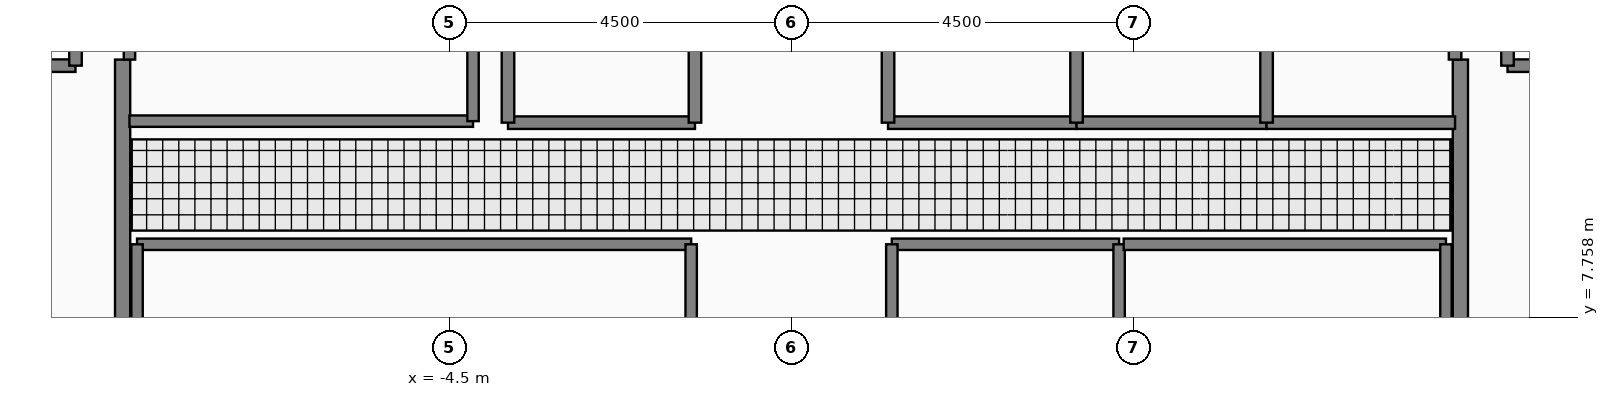
"""IFC4 building model, lengths in metres.
Left out: names, types, materials, properties, quantities, classifications, styles, units other than length and angle.
Written with IfcOpenShell. Run it as: python <this file> out.ifc"""

import sys

from ifc_helpers import new_model, si_unit, direction, frame, frame_2d, origin, place, context, subcontext, project, spatial, rectangle, extrude, element, fill, save


model = new_model("IFC4")
c1 = context("Model", 3, precision=1e-05, world=origin(), true_north=direction((0.0, 1.0)))
c2 = subcontext(c1, "Body", "Model", "MODEL_VIEW")
j1 = project(units=[si_unit("LENGTHUNIT", "METRE"), si_unit("PLANEANGLEUNIT", "RADIAN")], contexts=[c1])
p1 = place(None, origin())
s1 = spatial("IfcSite", under=j1, at=p1, CompositionType="ELEMENT")
p2 = place(p1, origin())
s2 = spatial("IfcBuilding", under=s1, at=p2, CompositionType="ELEMENT")
p3 = place(p2, frame((0.0, 0.0, 168.2)))
s3 = spatial("IfcBuildingStorey", under=s2, at=p3, CompositionType="ELEMENT", Elevation=168.2)
p4 = place(p3, frame((-8.8, 5.05, 0.0), z_axis=(0.0, 0.0, 1.0), x_axis=(0.0, 1.0, 0.0)))
e1 = element("IfcWall", 1, at=p4, inside=s3, PredefinedType="PARTITIONING", context=c2, shape_type="SweptSolid", body=[
    extrude(rectangle(XDim=6.1, YDim=0.2, at=frame_2d((3.05, 0.0))), origin(), (0.0, 0.0, 1.0), 4.38),
])
p5 = place(p4, frame((0.25, 0.0, 0.0)))
e2 = element("IfcOpeningElement", 2, at=p5, cuts=e1, PredefinedType="OPENING", context=c2, shape_type="SweptSolid", body=[
    extrude(rectangle(XDim=1.1, YDim=2.2, at=frame_2d((0.55, 1.1))), frame((0.0, 0.11, 0.0), z_axis=(0.0, -1.0, 0.0), x_axis=(1.0, 0.0, 0.0)), (0.0, 0.0, 1.0), 0.22),
])
p6 = place(p4, frame((3.85, 0.0, 0.0)))
e3 = element("IfcOpeningElement", 3, at=p6, cuts=e1, PredefinedType="OPENING", context=c2, shape_type="SweptSolid", body=[
    extrude(rectangle(XDim=1.1, YDim=2.2, at=frame_2d((0.55, 1.1))), frame((0.0, 0.11, 0.0), z_axis=(0.0, -1.0, 0.0), x_axis=(1.0, 0.0, 0.0)), (0.0, 0.0, 1.0), 0.22),
])
p7 = place(p3, frame((8.8, 11.15, 0.0), z_axis=(0.0, 0.0, 1.0), x_axis=(0.0, -1.0, 0.0)))
e4 = element("IfcWall", 4, at=p7, inside=s3, PredefinedType="PARTITIONING", context=c2, shape_type="SweptSolid", body=[
    extrude(rectangle(XDim=6.1, YDim=0.2, at=frame_2d((3.05, 0.0))), origin(), (0.0, 0.0, 1.0), 4.38),
])
p8 = place(p7, frame((1.15, 0.0, 0.0)))
e5 = element("IfcOpeningElement", 5, at=p8, cuts=e4, PredefinedType="OPENING", context=c2, shape_type="SweptSolid", body=[
    extrude(rectangle(XDim=1.1, YDim=2.2, at=frame_2d((0.55, 1.1))), frame((0.0, 0.11, 0.0), z_axis=(0.0, -1.0, 0.0), x_axis=(1.0, 0.0, 0.0)), (0.0, 0.0, 1.0), 0.22),
])
p9 = place(p7, frame((4.75, 0.0, 0.0)))
e6 = element("IfcOpeningElement", 6, at=p9, cuts=e4, PredefinedType="OPENING", context=c2, shape_type="SweptSolid", body=[
    extrude(rectangle(XDim=1.1, YDim=2.2, at=frame_2d((0.55, 1.1))), frame((0.0, 0.11, 0.0), z_axis=(0.0, -1.0, 0.0), x_axis=(1.0, 0.0, 0.0)), (0.0, 0.0, 1.0), 0.22),
])
p10 = place(p3, frame((-11.58, 11.07, 0.0), z_axis=(0.0, 0.0, 1.0), x_axis=(1.0, 0.0, 0.0)))
e7 = element("IfcWall", 7, at=p10, inside=s3, PredefinedType="PARTITIONING", context=c2, shape_type="SweptSolid", body=[
    extrude(rectangle(XDim=2.16, YDim=0.165, at=frame_2d((1.08, 0.0))), origin(), (0.0, 0.0, 1.0), 4.38),
])
p11 = place(p10, frame((0.53, 0.0, 0.0)))
e8 = element("IfcOpeningElement", 8, at=p11, cuts=e7, PredefinedType="OPENING", context=c2, shape_type="SweptSolid", body=[
    extrude(rectangle(XDim=1.15, YDim=2.25, at=frame_2d((0.575, 1.125))), frame((0.0, 0.093, 0.0), z_axis=(0.0, -1.0, 0.0), x_axis=(1.0, 0.0, 0.0)), (0.0, 0.0, 1.0), 0.185),
])
p12 = place(p3, frame((9.42, 11.07, 0.0), z_axis=(0.0, 0.0, 1.0), x_axis=(1.0, 0.0, 0.0)))
e9 = element("IfcWall", 9, at=p12, inside=s3, PredefinedType="PARTITIONING", context=c2, shape_type="SweptSolid", body=[
    extrude(rectangle(XDim=2.16, YDim=0.165, at=frame_2d((1.08, 0.0))), origin(), (0.0, 0.0, 1.0), 4.38),
])
p13 = place(p12, frame((0.53, 0.0, 0.0)))
e10 = element("IfcOpeningElement", 10, at=p13, cuts=e9, PredefinedType="OPENING", context=c2, shape_type="SweptSolid", body=[
    extrude(rectangle(XDim=1.15, YDim=2.25, at=frame_2d((0.575, 1.125))), frame((0.0, 0.093, 0.0), z_axis=(0.0, -1.0, 0.0), x_axis=(1.0, 0.0, 0.0)), (0.0, 0.0, 1.0), 0.185),
])
p14 = place(p3, frame((-3.73, 10.32, 0.0), z_axis=(0.0, 0.0, 1.0), x_axis=(1.0, 0.0, 0.0)))
e11 = element("IfcWall", 11, at=p14, inside=s3, PredefinedType="PARTITIONING", context=c2, shape_type="SweptSolid", body=[
    extrude(rectangle(XDim=2.46, YDim=0.165, at=frame_2d((1.23, 0.0))), origin(), (0.0, 0.0, 1.0), 4.38),
])
p15 = place(p14, frame((0.68, 0.0, 0.0)))
e12 = element("IfcOpeningElement", 12, at=p15, cuts=e11, PredefinedType="OPENING", context=c2, shape_type="SweptSolid", body=[
    extrude(rectangle(XDim=1.1, YDim=2.25, at=frame_2d((0.55, 1.125))), frame((0.0, 0.093, 0.0), z_axis=(0.0, -1.0, 0.0), x_axis=(1.0, 0.0, 0.0)), (0.0, 0.0, 1.0), 0.185),
])
p16 = place(p3, frame((1.27, 10.32, 0.0), z_axis=(0.0, 0.0, 1.0), x_axis=(1.0, 0.0, 0.0)))
e13 = element("IfcWall", 13, at=p16, inside=s3, PredefinedType="PARTITIONING", context=c2, shape_type="SweptSolid", body=[
    extrude(rectangle(XDim=2.48, YDim=0.165, at=frame_2d((1.24, 0.0))), origin(), (0.0, 0.0, 1.0), 4.38),
])
p17 = place(p16, frame((0.69, 0.0, 0.0)))
e14 = element("IfcOpeningElement", 14, at=p17, cuts=e13, PredefinedType="OPENING", context=c2, shape_type="SweptSolid", body=[
    extrude(rectangle(XDim=1.1, YDim=2.25, at=frame_2d((0.55, 1.125))), frame((0.0, 0.093, 0.0), z_axis=(0.0, -1.0, 0.0), x_axis=(1.0, 0.0, 0.0)), (0.0, 0.0, 1.0), 0.185),
])
p18 = place(p3, frame((3.75, 10.32, 0.0), z_axis=(0.0, 0.0, 1.0), x_axis=(1.0, 0.0, 0.0)))
e15 = element("IfcWall", 15, at=p18, inside=s3, PredefinedType="PARTITIONING", context=c2, shape_type="SweptSolid", body=[
    extrude(rectangle(XDim=2.5, YDim=0.165, at=frame_2d((1.25, 0.0))), origin(), (0.0, 0.0, 1.0), 4.38),
])
p19 = place(p18, frame((0.7, 0.0, 0.0)))
e16 = element("IfcOpeningElement", 16, at=p19, cuts=e15, PredefinedType="OPENING", context=c2, shape_type="SweptSolid", body=[
    extrude(rectangle(XDim=1.1, YDim=2.25, at=frame_2d((0.55, 1.125))), frame((0.0, 0.093, 0.0), z_axis=(0.0, -1.0, 0.0), x_axis=(1.0, 0.0, 0.0)), (0.0, 0.0, 1.0), 0.185),
])
p20 = place(p3, frame((6.25, 10.32, 0.0), z_axis=(0.0, 0.0, 1.0), x_axis=(1.0, 0.0, 0.0)))
e17 = element("IfcWall", 17, at=p20, inside=s3, PredefinedType="PARTITIONING", context=c2, shape_type="SweptSolid", body=[
    extrude(rectangle(XDim=2.48, YDim=0.165, at=frame_2d((1.24, 0.0))), origin(), (0.0, 0.0, 1.0), 4.38),
])
p21 = place(p20, frame((0.69, 0.0, 0.0)))
e18 = element("IfcOpeningElement", 18, at=p21, cuts=e17, PredefinedType="OPENING", context=c2, shape_type="SweptSolid", body=[
    extrude(rectangle(XDim=1.1, YDim=2.25, at=frame_2d((0.55, 1.125))), frame((0.0, 0.093, 0.0), z_axis=(0.0, -1.0, 0.0), x_axis=(1.0, 0.0, 0.0)), (0.0, 0.0, 1.0), 0.185),
])
p22 = place(p3, frame((-8.71, 10.34, 0.0), z_axis=(0.0, 0.0, 1.0), x_axis=(1.0, 0.0, 0.0)))
e19 = element("IfcWall", 19, at=p22, inside=s3, PredefinedType="PARTITIONING", context=c2, shape_type="SweptSolid", body=[
    extrude(rectangle(XDim=4.52, YDim=0.15, at=frame_2d((2.26, 0.0))), origin(), (0.0, 0.0, 1.0), 4.38),
])
p23 = place(p22, frame((1.81, 0.0, 0.0)))
e20 = element("IfcOpeningElement", 20, at=p23, cuts=e19, PredefinedType="OPENING", context=c2, shape_type="SweptSolid", body=[
    extrude(rectangle(XDim=0.9, YDim=2.15, at=frame_2d((0.45, 1.075))), frame((0.0, 0.085, 0.0), z_axis=(0.0, -1.0, 0.0), x_axis=(1.0, 0.0, 0.0)), (0.0, 0.0, 1.0), 0.17),
])
p24 = place(p3, frame((1.32, 8.72, 0.0), z_axis=(0.0, 0.0, 1.0), x_axis=(1.0, 0.0, 0.0)))
e21 = element("IfcWall", 21, at=p24, inside=s3, PredefinedType="PARTITIONING", context=c2, shape_type="SweptSolid", body=[
    extrude(rectangle(XDim=2.99, YDim=0.15, at=frame_2d((1.495, 0.0))), origin(), (0.0, 0.0, 1.0), 4.38),
])
p25 = place(p24, frame((1.045, 0.0, 0.0)))
e22 = element("IfcOpeningElement", 22, at=p25, cuts=e21, PredefinedType="OPENING", context=c2, shape_type="SweptSolid", body=[
    extrude(rectangle(XDim=0.9, YDim=2.15, at=frame_2d((0.45, 1.075))), frame((0.0, 0.085, 0.0), z_axis=(0.0, -1.0, 0.0), x_axis=(1.0, 0.0, 0.0)), (0.0, 0.0, 1.0), 0.17),
])
for number, where, z_axis, x_axis in (
    (23, (-9.42, 11.07, 0.0), (0.0, 0.0, 1.0), (0.0, 1.0, 0.0)),
    (24, (9.42, 11.07, 0.0), (0.0, 0.0, 1.0), (0.0, 1.0, 0.0)),
):
    element("IfcWall", number, at=place(p3, frame(where, z_axis=z_axis, x_axis=x_axis)), inside=s3, PredefinedType="PARTITIONING", context=c2, shape_type="SweptSolid", body=[
        extrude(rectangle(XDim=2.96, YDim=0.165, at=frame_2d((1.48, 0.0))), origin(), (0.0, 0.0, 1.0), 4.38),
    ])
for number, where, z_axis, x_axis in (
    (25, (-3.73, 10.32, 0.0), (0.0, 0.0, 1.0), (0.0, 1.0, 0.0)),
    (26, (-1.27, 10.32, 0.0), (0.0, 0.0, 1.0), (0.0, 1.0, 0.0)),
    (27, (1.27, 10.32, 0.0), (0.0, 0.0, 1.0), (0.0, 1.0, 0.0)),
    (28, (3.75, 10.32, 0.0), (0.0, 0.0, 1.0), (0.0, 1.0, 0.0)),
    (29, (6.25, 10.32, 0.0), (0.0, 0.0, 1.0), (0.0, 1.0, 0.0)),
):
    element("IfcWall", number, at=place(p3, frame(where, z_axis=z_axis, x_axis=x_axis)), inside=s3, PredefinedType="PARTITIONING", context=c2, shape_type="SweptSolid", body=[
        extrude(rectangle(XDim=2.36, YDim=0.165, at=frame_2d((1.18, 0.0))), origin(), (0.0, 0.0, 1.0), 4.38),
    ])
p26 = place(p3, frame((8.73, 11.15, 0.0), z_axis=(0.0, 0.0, 1.0), x_axis=(0.0, 1.0, 0.0)))
e30 = element("IfcWall", 30, at=p26, inside=s3, PredefinedType="PARTITIONING", context=c2, shape_type="SweptSolid", body=[
    extrude(rectangle(XDim=1.53, YDim=0.165, at=frame_2d((0.765, 0.0))), origin(), (0.0, 0.0, 1.0), 4.38),
])
p27 = place(p3, frame((-8.71, 11.15, 0.0), z_axis=(0.0, 0.0, 1.0), x_axis=(0.0, 1.0, 0.0)))
e31 = element("IfcWall", 31, at=p27, inside=s3, PredefinedType="PARTITIONING", context=c2, shape_type="SweptSolid", body=[
    extrude(rectangle(XDim=1.71, YDim=0.15, at=frame_2d((0.855, 0.0))), origin(), (0.0, 0.0, 1.0), 4.38),
])
p28 = place(p3, frame((-4.19, 10.34, 0.0), z_axis=(0.0, 0.0, 1.0), x_axis=(0.0, 1.0, 0.0)))
e32 = element("IfcWall", 32, at=p28, inside=s3, PredefinedType="PARTITIONING", context=c2, shape_type="SweptSolid", body=[
    extrude(rectangle(XDim=2.52, YDim=0.15, at=frame_2d((1.26, 0.0))), origin(), (0.0, 0.0, 1.0), 4.38),
])
p29 = place(p3, frame((-8.61, 8.72, 0.0), z_axis=(0.0, 0.0, 1.0), x_axis=(1.0, 0.0, 0.0)))
e33 = element("IfcWall", 33, at=p29, inside=s3, PredefinedType="PARTITIONING", context=c2, shape_type="SweptSolid", body=[
    extrude(rectangle(XDim=7.29, YDim=0.15, at=frame_2d((3.645, 0.0))), origin(), (0.0, 0.0, 1.0), 4.38),
])
for number, where, z_axis, x_axis in (
    (34, (-8.61, 6.48, 0.0), (0.0, 0.0, 1.0), (0.0, 1.0, 0.0)),
    (35, (-1.32, 6.48, 0.0), (0.0, 0.0, 1.0), (0.0, 1.0, 0.0)),
    (36, (1.32, 6.48, 0.0), (0.0, 0.0, 1.0), (0.0, 1.0, 0.0)),
    (37, (4.31, 6.48, 0.0), (0.0, 0.0, 1.0), (0.0, 1.0, 0.0)),
):
    element("IfcWall", number, at=place(p3, frame(where, z_axis=z_axis, x_axis=x_axis)), inside=s3, PredefinedType="PARTITIONING", context=c2, shape_type="SweptSolid", body=[
        extrude(rectangle(XDim=2.24, YDim=0.15, at=frame_2d((1.12, 0.0))), origin(), (0.0, 0.0, 1.0), 4.38),
    ])
p30 = place(p3, frame((4.37, 8.72, 0.0), z_axis=(0.0, 0.0, 1.0), x_axis=(1.0, 0.0, 0.0)))
e38 = element("IfcWall", 38, at=p30, inside=s3, PredefinedType="PARTITIONING", context=c2, shape_type="SweptSolid", body=[
    extrude(rectangle(XDim=4.24, YDim=0.15, at=frame_2d((2.12, 0.0))), origin(), (0.0, 0.0, 1.0), 4.38),
])
p31 = place(p3, frame((8.61, 6.48, 0.0), z_axis=(0.0, 0.0, 1.0), x_axis=(0.0, 1.0, 0.0)))
e39 = element("IfcWall", 39, at=p31, inside=s3, PredefinedType="PARTITIONING", context=c2, shape_type="SweptSolid", body=[
    extrude(rectangle(XDim=2.24, YDim=0.15, at=frame_2d((1.12, 0.0))), origin(), (0.0, 0.0, 1.0), 4.38),
])
p32 = place(p6, origin())
e40 = element("IfcDoor", 40, at=p32, inside=s3, OperationType="SINGLE_SWING_RIGHT", PredefinedType="DOOR", context=c2, shape_type="SweptSolid", body=[
    extrude(rectangle(XDim=1.1, YDim=2.2, at=frame_2d((0.55, 1.1))), frame((0.0, 0.025, 0.0), z_axis=(0.0, -1.0, 0.0), x_axis=(1.0, 0.0, 0.0)), (0.0, 0.0, 1.0), 0.05),
])
fill(e3, e40)
p33 = place(p8, origin())
e41 = element("IfcDoor", 41, at=p33, inside=s3, OperationType="SINGLE_SWING_LEFT", PredefinedType="DOOR", context=c2, shape_type="SweptSolid", body=[
    extrude(rectangle(XDim=1.1, YDim=2.2, at=frame_2d((0.55, 1.1))), frame((0.0, 0.025, 0.0), z_axis=(0.0, -1.0, 0.0), x_axis=(1.0, 0.0, 0.0)), (0.0, 0.0, 1.0), 0.05),
])
fill(e5, e41)
p34 = place(p15, origin())
e42 = element("IfcDoor", 42, at=p34, inside=s3, OperationType="SLIDING_TO_LEFT", PredefinedType="DOOR", context=c2, shape_type="SweptSolid", body=[
    extrude(rectangle(XDim=1.1, YDim=2.25, at=frame_2d((0.55, 1.125))), frame((0.0, 0.025, 0.0), z_axis=(0.0, -1.0, 0.0), x_axis=(1.0, 0.0, 0.0)), (0.0, 0.0, 1.0), 0.05),
])
fill(e12, e42)
p35 = place(p17, origin())
e43 = element("IfcDoor", 43, at=p35, inside=s3, OperationType="SLIDING_TO_LEFT", PredefinedType="DOOR", context=c2, shape_type="SweptSolid", body=[
    extrude(rectangle(XDim=1.1, YDim=2.25, at=frame_2d((0.55, 1.125))), frame((0.0, 0.025, 0.0), z_axis=(0.0, -1.0, 0.0), x_axis=(1.0, 0.0, 0.0)), (0.0, 0.0, 1.0), 0.05),
])
fill(e14, e43)
p36 = place(p19, origin())
e44 = element("IfcDoor", 44, at=p36, inside=s3, OperationType="SLIDING_TO_LEFT", PredefinedType="DOOR", context=c2, shape_type="SweptSolid", body=[
    extrude(rectangle(XDim=1.1, YDim=2.25, at=frame_2d((0.55, 1.125))), frame((0.0, 0.025, 0.0), z_axis=(0.0, -1.0, 0.0), x_axis=(1.0, 0.0, 0.0)), (0.0, 0.0, 1.0), 0.05),
])
fill(e16, e44)
p37 = place(p21, origin())
e45 = element("IfcDoor", 45, at=p37, inside=s3, OperationType="SLIDING_TO_LEFT", PredefinedType="DOOR", context=c2, shape_type="SweptSolid", body=[
    extrude(rectangle(XDim=1.1, YDim=2.25, at=frame_2d((0.55, 1.125))), frame((0.0, 0.025, 0.0), z_axis=(0.0, -1.0, 0.0), x_axis=(1.0, 0.0, 0.0)), (0.0, 0.0, 1.0), 0.05),
])
fill(e18, e45)
p38 = place(p23, origin())
e46 = element("IfcDoor", 46, at=p38, inside=s3, OperationType="SINGLE_SWING_RIGHT", PredefinedType="DOOR", context=c2, shape_type="SweptSolid", body=[
    extrude(rectangle(XDim=0.9, YDim=2.15, at=frame_2d((0.45, 1.075))), frame((0.0, 0.025, 0.0), z_axis=(0.0, -1.0, 0.0), x_axis=(1.0, 0.0, 0.0)), (0.0, 0.0, 1.0), 0.05),
])
fill(e20, e46)
p39 = place(p25, origin())
e47 = element("IfcDoor", 47, at=p39, inside=s3, OperationType="SINGLE_SWING_RIGHT", PredefinedType="DOOR", context=c2, shape_type="SweptSolid", body=[
    extrude(rectangle(XDim=0.9, YDim=2.15, at=frame_2d((0.45, 1.075))), frame((0.0, 0.025, 0.0), z_axis=(0.0, -1.0, 0.0), x_axis=(1.0, 0.0, 0.0)), (0.0, 0.0, 1.0), 0.05),
])
fill(e22, e47)
save(model, sys.argv[1])
